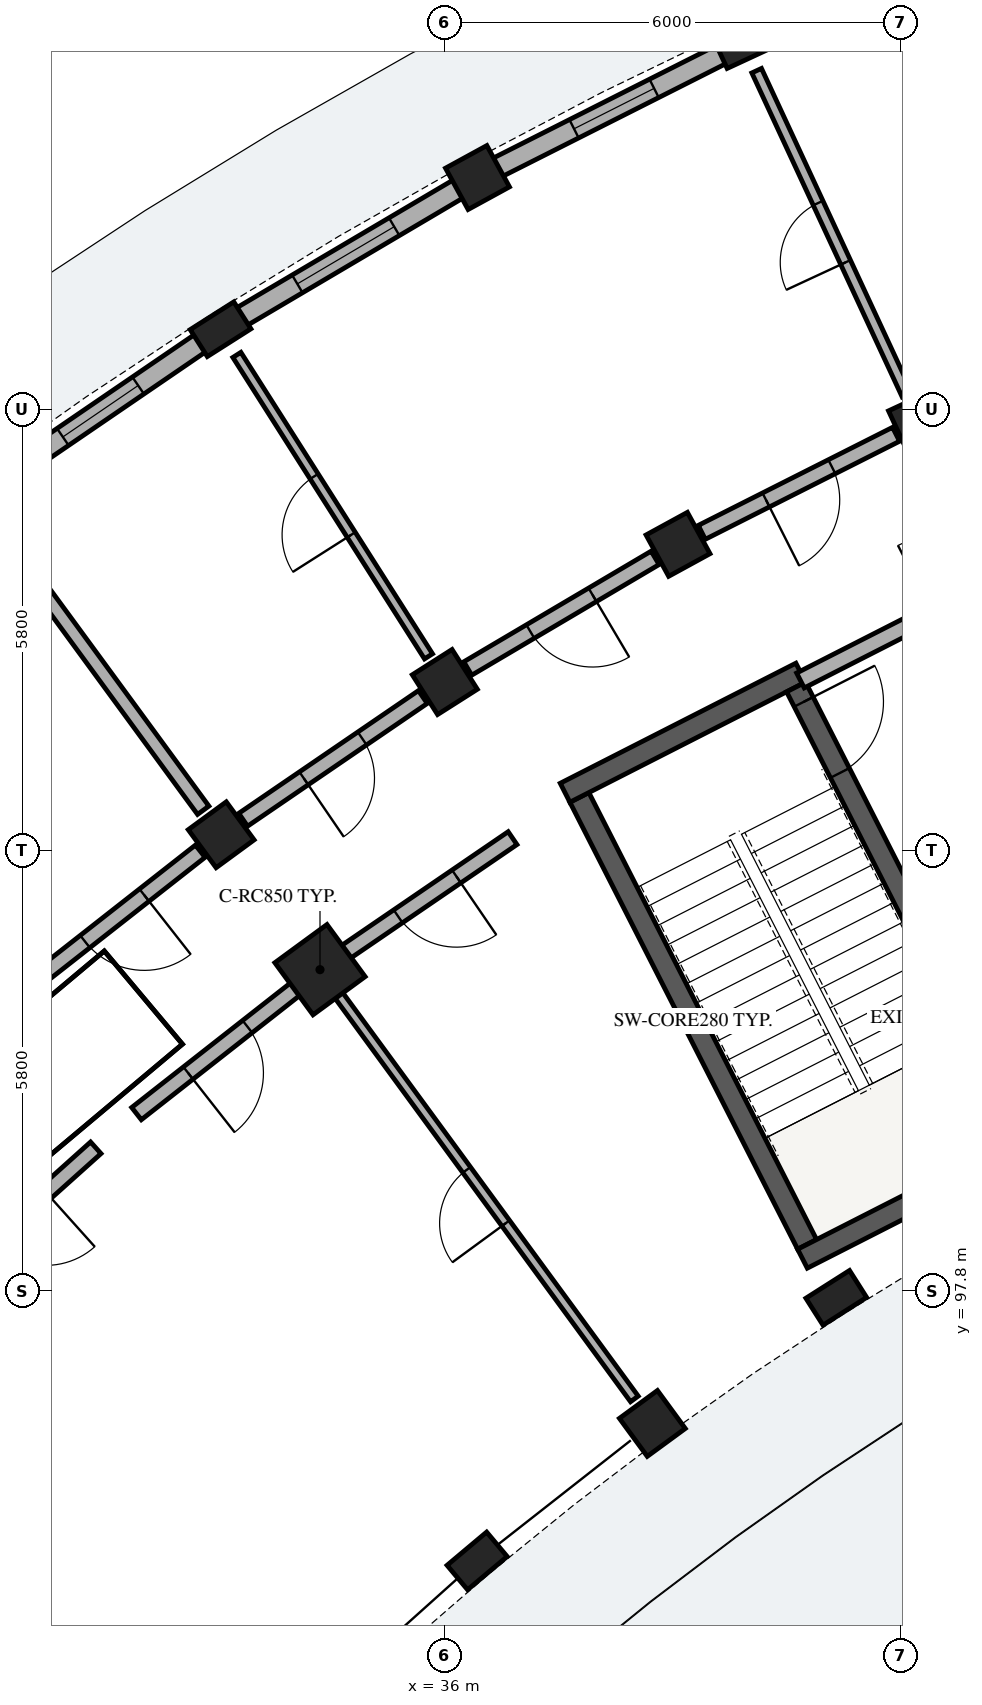
"""IFC4 building model, lengths in metres.
Left out: names, types, materials, properties, quantities, classifications, styles, units other than length and angle.
Written with IfcOpenShell. Run it as: python <this file> out.ifc"""

import sys

from ifc_helpers import new_model, si_unit, direction, frame, frame_2d, origin, origin_2d, place, context, subcontext, project, spatial, rectangle, extrude, element, fill, save


model = new_model("IFC4")
c1 = context("Model", 3, precision=1e-05, world=origin(), true_north=direction((0.0, 1.0)))
c2 = subcontext(c1, "Body", "Model", "MODEL_VIEW")
j1 = project(units=[si_unit("LENGTHUNIT", "METRE"), si_unit("PLANEANGLEUNIT", "RADIAN")], contexts=[c1])
p1 = place(None, origin())
s1 = spatial("IfcSite", under=j1, at=p1, CompositionType="ELEMENT")
p2 = place(p1, origin())
s2 = spatial("IfcBuilding", under=s1, at=p2, CompositionType="ELEMENT")
p3 = place(p2, origin())
s3 = spatial("IfcBuildingStorey", under=s2, at=p3, CompositionType="ELEMENT", Elevation=0.0)
p4 = place(p3, frame((37.773, 104.296, 0.0), z_axis=(0.0, 0.0, 1.0), x_axis=(0.453992276384, -0.891005618941, 0.0)))
e1 = element("IfcWall", 1, at=p4, inside=s3, PredefinedType="SHEAR", context=c2, shape_type="SweptSolid", body=[
    extrude(rectangle(XDim=6.6, YDim=0.28, at=frame_2d((3.3, 0.0))), origin(), (0.0, 0.0, 1.0), 4.48),
])
for number, where, z_axis, x_axis in (
    (2, (40.709, 98.227, 0.0), (0.0, 0.0, 1.0), (0.891, 0.454, 0.0)),
    (3, (37.585, 104.357, 0.0), (0.0, 0.0, 1.0), (0.891, 0.454, 0.0)),
):
    element("IfcWall", number, at=place(p3, frame(where, z_axis=z_axis, x_axis=x_axis)), inside=s3, PredefinedType="SHEAR", context=c2, shape_type="SweptSolid", body=[
        extrude(rectangle(XDim=3.48, YDim=0.28, at=frame_2d((1.74, 0.0))), origin(), (0.0, 0.0, 1.0), 4.48),
    ])
p5 = place(p3, frame((40.625, 105.748, 0.0), z_axis=(0.0, 0.0, 1.0), x_axis=(0.453992276384, -0.891005618941, 0.0)))
e4 = element("IfcWall", 4, at=p5, inside=s3, PredefinedType="SHEAR", context=c2, shape_type="SweptSolid", body=[
    extrude(rectangle(XDim=6.6, YDim=0.28, at=frame_2d((3.3, 0.0))), origin(), (0.0, 0.0, 1.0), 4.48),
])
p6 = place(p5, frame((0.22, 0.0, 0.0)))
e5 = element("IfcOpeningElement", 5, at=p6, cuts=e4, PredefinedType="OPENING", context=c2, shape_type="SweptSolid", body=[
    extrude(rectangle(XDim=1.05, YDim=2.15, at=frame_2d((0.525, 1.075))), frame((0.0, 0.15, 0.0), z_axis=(0.0, -1.0, 0.0), x_axis=(1.0, 0.0, 0.0)), (0.0, 0.0, 1.0), 0.3),
])
p7 = place(p3, frame((42.252, 109.23, 0.0), z_axis=(0.0, 0.0, 1.0), x_axis=(-0.420859924104, 0.907125638643, 0.0)))
e6 = element("IfcColumn", 6, at=p7, inside=s3, PredefinedType="COLUMN", context=c2, shape_type="SweptSolid", body=[
    extrude(rectangle(XDim=0.62, YDim=0.62, at=origin_2d()), origin(), (0.0, 0.0, 1.0), 4.485),
])
p8 = place(p3, frame((39.938, 114.219, 0.0), z_axis=(0.0, 0.0, 1.0), x_axis=(-0.420859924104, 0.907125638643, 0.0)))
e7 = element("IfcColumn", 7, at=p8, inside=s3, PredefinedType="PILASTER", context=c2, shape_type="SweptSolid", body=[
    extrude(rectangle(XDim=0.42, YDim=0.68, at=origin_2d()), origin(), (0.0, 0.0, 1.0), 4.485),
])
for number, where, z_axis, x_axis in (
    (8, (39.072, 107.625, 0.0), (0.0, 0.0, 1.0), (-0.48, 0.877, 0.0)),
    (9, (36.433, 112.451, 0.0), (0.0, 0.0, 1.0), (-0.48, 0.877, 0.0)),
):
    element("IfcColumn", number, at=place(p3, frame(where, z_axis=z_axis, x_axis=x_axis)), inside=s3, PredefinedType="COLUMN", context=c2, shape_type="SweptSolid", body=[
        extrude(rectangle(XDim=0.62, YDim=0.62, at=origin_2d()), origin(), (0.0, 0.0, 1.0), 4.485),
    ])
p9 = place(p3, frame((41.153, 97.712, 0.0), z_axis=(0.0, 0.0, 1.0), x_axis=(-0.536481603385, 0.843912015099, 0.0)))
e10 = element("IfcColumn", 10, at=p9, inside=s3, PredefinedType="PILASTER", context=c2, shape_type="SweptSolid", body=[
    extrude(rectangle(XDim=0.42, YDim=0.68, at=origin_2d()), origin(), (0.0, 0.0, 1.0), 4.485),
])
p10 = place(p3, frame((36.003, 105.813, 0.0), z_axis=(0.0, 0.0, 1.0), x_axis=(-0.536481603385, 0.843912015099, 0.0)))
e11 = element("IfcColumn", 11, at=p10, inside=s3, PredefinedType="COLUMN", context=c2, shape_type="SweptSolid", body=[
    extrude(rectangle(XDim=0.62, YDim=0.62, at=origin_2d()), origin(), (0.0, 0.0, 1.0), 4.485),
])
p11 = place(p3, frame((33.052, 110.455, 0.0), z_axis=(0.0, 0.0, 1.0), x_axis=(-0.536481603385, 0.843912015099, 0.0)))
e12 = element("IfcColumn", 12, at=p11, inside=s3, PredefinedType="PILASTER", context=c2, shape_type="SweptSolid", body=[
    extrude(rectangle(XDim=0.42, YDim=0.68, at=origin_2d()), origin(), (0.0, 0.0, 1.0), 4.485),
])
p12 = place(p3, frame((38.734, 96.059, 0.0), z_axis=(0.0, 0.0, 1.0), x_axis=(-0.590918628541, 0.806731166153, 0.0)))
e13 = element("IfcColumn", 13, at=p12, inside=s3, PredefinedType="COLUMN", context=c2, shape_type="SweptSolid", body=[
    extrude(rectangle(XDim=0.62, YDim=0.62, at=origin_2d()), origin(), (0.0, 0.0, 1.0), 4.485),
])
p13 = place(p3, frame((34.361, 102.029, 0.0), z_axis=(0.0, 0.0, 1.0), x_axis=(-0.590918628541, 0.806731166153, 0.0)))
e14 = element("IfcColumn", 14, at=p13, inside=s3, PredefinedType="COLUMN", context=c2, shape_type="SweptSolid", body=[
    extrude(rectangle(XDim=0.85, YDim=0.85, at=origin_2d()), origin(), (0.0, 0.0, 1.0), 4.485),
])
p14 = place(p3, frame((33.061, 103.804, 0.0), z_axis=(0.0, 0.0, 1.0), x_axis=(-0.590918628541, 0.806731166153, 0.0)))
e15 = element("IfcColumn", 15, at=p14, inside=s3, PredefinedType="COLUMN", context=c2, shape_type="SweptSolid", body=[
    extrude(rectangle(XDim=0.62, YDim=0.62, at=origin_2d()), origin(), (0.0, 0.0, 1.0), 4.485),
])
p15 = place(p3, frame((36.428, 94.251, 0.0), z_axis=(0.0, 0.0, 1.0), x_axis=(-0.642787636427, 0.766044420681, 0.0)))
e16 = element("IfcColumn", 16, at=p15, inside=s3, PredefinedType="PILASTER", context=c2, shape_type="SweptSolid", body=[
    extrude(rectangle(XDim=0.42, YDim=0.68, at=origin_2d()), origin(), (0.0, 0.0, 1.0), 4.485),
])
p16 = place(p3, frame((39.777, 114.138, 0.0), z_axis=(0.0, 0.0, 1.0), x_axis=(-0.892772658884, -0.450507468915, 0.0)))
e17 = element("IfcWall", 17, at=p16, inside=s3, PredefinedType="SOLIDWALL", context=c2, shape_type="SweptSolid", body=[
    extrude(rectangle(XDim=3.466, YDim=0.27, at=frame_2d((1.733, 0.0))), origin(), (0.0, 0.0, 1.0), 3.755),
])
p17 = place(p16, frame((1.143, 0.0, 0.55)))
e18 = element("IfcOpeningElement", 18, at=p17, cuts=e17, PredefinedType="OPENING", context=c2, shape_type="SweptSolid", body=[
    extrude(rectangle(XDim=1.18, YDim=1.48, at=frame_2d((0.59, 0.74))), frame((0.0, 0.145, 0.0), z_axis=(0.0, -1.0, 0.0), x_axis=(1.0, 0.0, 0.0)), (0.0, 0.0, 1.0), 0.29),
])
p18 = place(p3, frame((36.192, 112.308, 0.0), z_axis=(0.0, 0.0, 1.0), x_axis=(-0.861120000949, -0.508401754487, 0.0)))
e19 = element("IfcWall", 19, at=p18, inside=s3, PredefinedType="SOLIDWALL", context=c2, shape_type="SweptSolid", body=[
    extrude(rectangle(XDim=3.466, YDim=0.27, at=frame_2d((1.733, 0.0))), origin(), (0.0, 0.0, 1.0), 3.755),
])
p19 = place(p18, frame((0.993, 0.0, 0.55)))
e20 = element("IfcOpeningElement", 20, at=p19, cuts=e19, PredefinedType="OPENING", context=c2, shape_type="SweptSolid", body=[
    extrude(rectangle(XDim=1.48, YDim=1.62, at=frame_2d((0.74, 0.81))), frame((0.0, 0.145, 0.0), z_axis=(0.0, -1.0, 0.0), x_axis=(1.0, 0.0, 0.0)), (0.0, 0.0, 1.0), 0.29),
])
p20 = place(p3, frame((32.904, 110.354, 0.0), z_axis=(0.0, 0.0, 1.0), x_axis=(-0.825744165268, -0.564044832904, 0.0)))
e21 = element("IfcWall", 21, at=p20, inside=s3, PredefinedType="SOLIDWALL", context=c2, shape_type="SweptSolid", body=[
    extrude(rectangle(XDim=3.466, YDim=0.27, at=frame_2d((1.733, 0.0))), origin(), (0.0, 0.0, 1.0), 3.755),
])
p21 = place(p20, frame((1.133, 0.0, 0.55)))
e22 = element("IfcOpeningElement", 22, at=p21, cuts=e21, PredefinedType="OPENING", context=c2, shape_type="SweptSolid", body=[
    extrude(rectangle(XDim=1.2, YDim=1.51, at=frame_2d((0.6, 0.755))), frame((0.0, 0.145, 0.0), z_axis=(0.0, -1.0, 0.0), x_axis=(1.0, 0.0, 0.0)), (0.0, 0.0, 1.0), 0.29),
])
p22 = place(p3, frame((40.682, 105.834, 0.0), z_axis=(0.0, 0.0, 1.0), x_axis=(0.891003372311, 0.453996685595, 0.0)))
e23 = element("IfcWall", 23, at=p22, inside=s3, PredefinedType="PARTITIONING", context=c2, shape_type="SweptSolid", body=[
    extrude(rectangle(XDim=4.9, YDim=0.22, at=frame_2d((2.45, 0.0))), origin(), (0.0, 0.0, 1.0), 3.74),
])
p23 = place(p22, frame((1.95, 0.0, 0.0)))
e24 = element("IfcOpeningElement", 24, at=p23, cuts=e23, PredefinedType="OPENING", context=c2, shape_type="SweptSolid", body=[
    extrude(rectangle(XDim=1.0, YDim=2.15, at=frame_2d((0.5, 1.075))), frame((0.0, 0.12, 0.0), z_axis=(0.0, -1.0, 0.0), x_axis=(1.0, 0.0, 0.0)), (0.0, 0.0, 1.0), 0.24),
])
p24 = place(p3, frame((42.084, 109.593, 0.0), z_axis=(0.0, 0.0, 1.0), x_axis=(-0.420862519045, 0.907124434718, 0.0)))
e25 = element("IfcWall", 25, at=p24, inside=s3, PredefinedType="PLUMBINGWALL", context=c2, shape_type="SweptSolid", body=[
    extrude(rectangle(XDim=4.7, YDim=0.14, at=frame_2d((2.35, 0.0))), origin(), (0.0, 0.0, 1.0), 3.1),
])
p25 = place(p24, frame((1.92, 0.0, 0.0)))
e26 = element("IfcOpeningElement", 26, at=p25, cuts=e25, PredefinedType="OPENING", context=c2, shape_type="SweptSolid", body=[
    extrude(rectangle(XDim=0.86, YDim=2.06, at=frame_2d((0.43, 1.03))), frame((0.0, 0.08, 0.0), z_axis=(0.0, -1.0, 0.0), x_axis=(1.0, 0.0, 0.0)), (0.0, 0.0, 1.0), 0.16),
])
p26 = place(p3, frame((41.94, 109.073, 0.0), z_axis=(0.0, 0.0, 1.0), x_axis=(-0.89273239336, -0.450587254419, 0.0)))
e27 = element("IfcWall", 27, at=p26, inside=s3, PredefinedType="PARTITIONING", context=c2, shape_type="SweptSolid", body=[
    extrude(rectangle(XDim=2.863, YDim=0.205, at=frame_2d((1.432, 0.0))), origin(), (0.0, 0.0, 1.0), 3.1),
])
p27 = place(p26, frame((0.947, 0.0, 0.0)))
e28 = element("IfcOpeningElement", 28, at=p27, cuts=e27, PredefinedType="OPENING", context=c2, shape_type="SweptSolid", body=[
    extrude(rectangle(XDim=0.97, YDim=2.15, at=frame_2d((0.485, 1.075))), frame((0.0, 0.113, 0.0), z_axis=(0.0, -1.0, 0.0), x_axis=(1.0, 0.0, 0.0)), (0.0, 0.0, 1.0), 0.225),
])
p28 = place(p3, frame((38.77, 107.447, 0.0), z_axis=(0.0, 0.0, 1.0), x_axis=(-0.861113214678, -0.508413248753, 0.0)))
e29 = element("IfcWall", 29, at=p28, inside=s3, PredefinedType="PARTITIONING", context=c2, shape_type="SweptSolid", body=[
    extrude(rectangle(XDim=2.863, YDim=0.205, at=frame_2d((1.432, 0.0))), origin(), (0.0, 0.0, 1.0), 3.1),
])
p29 = place(p28, frame((0.957, 0.0, 0.0)))
e30 = element("IfcOpeningElement", 30, at=p29, cuts=e29, PredefinedType="OPENING", context=c2, shape_type="SweptSolid", body=[
    extrude(rectangle(XDim=0.95, YDim=2.13, at=frame_2d((0.475, 1.065))), frame((0.0, 0.113, 0.0), z_axis=(0.0, -1.0, 0.0), x_axis=(1.0, 0.0, 0.0)), (0.0, 0.0, 1.0), 0.225),
])
p30 = place(p3, frame((35.789, 106.151, 0.0), z_axis=(0.0, 0.0, 1.0), x_axis=(-0.536492262982, 0.843905238614, 0.0)))
e31 = element("IfcWall", 31, at=p30, inside=s3, PredefinedType="PARTITIONING", context=c2, shape_type="SweptSolid", body=[
    extrude(rectangle(XDim=4.7, YDim=0.125, at=frame_2d((2.35, 0.0))), origin(), (0.0, 0.0, 1.0), 3.1),
])
p31 = place(p30, frame((1.895, 0.0, 0.0)))
e32 = element("IfcOpeningElement", 32, at=p31, cuts=e31, PredefinedType="OPENING", context=c2, shape_type="SweptSolid", body=[
    extrude(rectangle(XDim=0.91, YDim=2.1, at=frame_2d((0.455, 1.05))), frame((0.0, 0.073, 0.0), z_axis=(0.0, -1.0, 0.0), x_axis=(1.0, 0.0, 0.0)), (0.0, 0.0, 1.0), 0.145),
])
p32 = place(p3, frame((35.714, 105.616, 0.0), z_axis=(0.0, 0.0, 1.0), x_axis=(-0.825779671787, -0.563992848947, 0.0)))
e33 = element("IfcWall", 33, at=p32, inside=s3, PredefinedType="PARTITIONING", context=c2, shape_type="SweptSolid", body=[
    extrude(rectangle(XDim=2.863, YDim=0.205, at=frame_2d((1.432, 0.0))), origin(), (0.0, 0.0, 1.0), 3.1),
])
p33 = place(p32, frame((0.967, 0.0, 0.0)))
e34 = element("IfcOpeningElement", 34, at=p33, cuts=e33, PredefinedType="OPENING", context=c2, shape_type="SweptSolid", body=[
    extrude(rectangle(XDim=0.93, YDim=2.12, at=frame_2d((0.465, 1.06))), frame((0.0, 0.113, 0.0), z_axis=(0.0, -1.0, 0.0), x_axis=(1.0, 0.0, 0.0)), (0.0, 0.0, 1.0), 0.225),
])
p34 = place(p3, frame((36.895, 103.76, 0.0), z_axis=(0.0, 0.0, 1.0), x_axis=(-0.825752009056, -0.56403334967, 0.0)))
e35 = element("IfcWall", 35, at=p34, inside=s3, PredefinedType="PARTITIONING", context=c2, shape_type="SweptSolid", body=[
    extrude(rectangle(XDim=2.718, YDim=0.205, at=frame_2d((1.359, 0.0))), origin(), (0.0, 0.0, 1.0), 3.1),
])
p35 = place(p34, frame((0.894, 0.0, 0.0)))
e36 = element("IfcOpeningElement", 36, at=p35, cuts=e35, PredefinedType="OPENING", context=c2, shape_type="SweptSolid", body=[
    extrude(rectangle(XDim=0.93, YDim=2.12, at=frame_2d((0.465, 1.06))), frame((0.0, 0.113, 0.0), z_axis=(0.0, -1.0, 0.0), x_axis=(1.0, 0.0, 0.0)), (0.0, 0.0, 1.0), 0.225),
])
p36 = place(p3, frame((32.824, 104.126, 0.0), z_axis=(0.0, 0.0, 1.0), x_axis=(-0.590910940129, 0.806736797745, 0.0)))
e37 = element("IfcWall", 37, at=p36, inside=s3, PredefinedType="PARTITIONING", context=c2, shape_type="SweptSolid", body=[
    extrude(rectangle(XDim=4.7, YDim=0.185, at=frame_2d((2.35, 0.0))), origin(), (0.0, 0.0, 1.0), 3.1),
])
p37 = place(p3, frame((38.497, 96.382, 0.0), z_axis=(0.0, 0.0, 1.0), x_axis=(-0.590924179316, 0.806727100263, 0.0)))
e38 = element("IfcWall", 38, at=p37, inside=s3, PredefinedType="PARTITIONING", context=c2, shape_type="SweptSolid", body=[
    extrude(rectangle(XDim=6.6, YDim=0.125, at=frame_2d((3.3, 0.0))), origin(), (0.0, 0.0, 1.0), 3.1),
])
p38 = place(p37, frame((2.865, 0.0, 0.0)))
e39 = element("IfcOpeningElement", 39, at=p38, cuts=e38, PredefinedType="OPENING", context=c2, shape_type="SweptSolid", body=[
    extrude(rectangle(XDim=0.87, YDim=2.08, at=frame_2d((0.435, 1.04))), frame((0.0, 0.073, 0.0), z_axis=(0.0, -1.0, 0.0), x_axis=(1.0, 0.0, 0.0)), (0.0, 0.0, 1.0), 0.145),
])
p39 = place(p3, frame((32.785, 103.588, 0.0), z_axis=(0.0, 0.0, 1.0), x_axis=(-0.786806323554, -0.617199975061, 0.0)))
e40 = element("IfcWall", 40, at=p39, inside=s3, PredefinedType="PARTITIONING", context=c2, shape_type="SweptSolid", body=[
    extrude(rectangle(XDim=2.863, YDim=0.205, at=frame_2d((1.432, 0.0))), origin(), (0.0, 0.0, 1.0), 3.1),
])
p40 = place(p39, frame((0.937, 0.0, 0.0)))
e41 = element("IfcOpeningElement", 41, at=p40, cuts=e40, PredefinedType="OPENING", context=c2, shape_type="SweptSolid", body=[
    extrude(rectangle(XDim=0.99, YDim=2.16, at=frame_2d((0.495, 1.08))), frame((0.0, 0.113, 0.0), z_axis=(0.0, -1.0, 0.0), x_axis=(1.0, 0.0, 0.0)), (0.0, 0.0, 1.0), 0.225),
])
p41 = place(p3, frame((34.085, 101.813, 0.0), z_axis=(0.0, 0.0, 1.0), x_axis=(-0.786835457019, -0.617162833924, 0.0)))
e42 = element("IfcWall", 42, at=p41, inside=s3, PredefinedType="PARTITIONING", context=c2, shape_type="SweptSolid", body=[
    extrude(rectangle(XDim=2.718, YDim=0.205, at=frame_2d((1.359, 0.0))), origin(), (0.0, 0.0, 1.0), 3.1),
])
p42 = place(p41, frame((0.864, 0.0, 0.0)))
e43 = element("IfcOpeningElement", 43, at=p42, cuts=e42, PredefinedType="OPENING", context=c2, shape_type="SweptSolid", body=[
    extrude(rectangle(XDim=0.99, YDim=2.16, at=frame_2d((0.495, 1.08))), frame((0.0, 0.113, 0.0), z_axis=(0.0, -1.0, 0.0), x_axis=(1.0, 0.0, 0.0)), (0.0, 0.0, 1.0), 0.225),
])
p43 = place(p3, frame((31.411, 99.686, 0.0), z_axis=(0.0, 0.0, 1.0), x_axis=(-0.744418559135, -0.667713268413, 0.0)))
e44 = element("IfcWall", 44, at=p43, inside=s3, PredefinedType="PARTITIONING", context=c2, shape_type="SweptSolid", body=[
    extrude(rectangle(XDim=2.718, YDim=0.205, at=frame_2d((1.359, 0.0))), origin(), (0.0, 0.0, 1.0), 3.1),
])
p44 = place(p43, frame((0.879, 0.0, 0.0)))
e45 = element("IfcOpeningElement", 45, at=p44, cuts=e44, PredefinedType="OPENING", context=c2, shape_type="SweptSolid", body=[
    extrude(rectangle(XDim=0.96, YDim=2.1, at=frame_2d((0.48, 1.05))), frame((0.0, 0.113, 0.0), z_axis=(0.0, -1.0, 0.0), x_axis=(1.0, 0.0, 0.0)), (0.0, 0.0, 1.0), 0.225),
])
p45 = place(p17, origin())
e46 = element("IfcWindow", 46, at=p45, inside=s3, PartitioningType="SINGLE_PANEL", PredefinedType="WINDOW", context=c2, shape_type="SweptSolid", body=[
    extrude(rectangle(XDim=1.18, YDim=1.48, at=frame_2d((0.59, 0.74))), frame((0.0, 0.03, 0.0), z_axis=(0.0, -1.0, 0.0), x_axis=(1.0, 0.0, 0.0)), (0.0, 0.0, 1.0), 0.06),
])
fill(e18, e46)
p46 = place(p19, origin())
e47 = element("IfcWindow", 47, at=p46, inside=s3, PartitioningType="SINGLE_PANEL", PredefinedType="WINDOW", context=c2, shape_type="SweptSolid", body=[
    extrude(rectangle(XDim=1.48, YDim=1.62, at=frame_2d((0.74, 0.81))), frame((0.0, 0.03, 0.0), z_axis=(0.0, -1.0, 0.0), x_axis=(1.0, 0.0, 0.0)), (0.0, 0.0, 1.0), 0.06),
])
fill(e20, e47)
p47 = place(p21, origin())
e48 = element("IfcWindow", 48, at=p47, inside=s3, PartitioningType="SINGLE_PANEL", PredefinedType="WINDOW", context=c2, shape_type="SweptSolid", body=[
    extrude(rectangle(XDim=1.2, YDim=1.51, at=frame_2d((0.6, 0.755))), frame((0.0, 0.03, 0.0), z_axis=(0.0, -1.0, 0.0), x_axis=(1.0, 0.0, 0.0)), (0.0, 0.0, 1.0), 0.06),
])
fill(e22, e48)
p48 = place(p6, origin())
e49 = element("IfcDoor", 49, at=p48, inside=s3, OperationType="SINGLE_SWING_LEFT", PredefinedType="DOOR", context=c2, shape_type="SweptSolid", body=[
    extrude(rectangle(XDim=1.05, YDim=2.15, at=frame_2d((0.525, 1.075))), frame((0.0, 0.025, 0.0), z_axis=(0.0, -1.0, 0.0), x_axis=(1.0, 0.0, 0.0)), (0.0, 0.0, 1.0), 0.05),
])
fill(e5, e49)
p49 = place(p25, origin())
e50 = element("IfcDoor", 50, at=p49, inside=s3, OperationType="SINGLE_SWING_LEFT", PredefinedType="DOOR", context=c2, shape_type="SweptSolid", body=[
    extrude(rectangle(XDim=0.86, YDim=2.06, at=frame_2d((0.43, 1.03))), frame((0.0, 0.025, 0.0), z_axis=(0.0, -1.0, 0.0), x_axis=(1.0, 0.0, 0.0)), (0.0, 0.0, 1.0), 0.05),
])
fill(e26, e50)
p50 = place(p27, origin())
e51 = element("IfcDoor", 51, at=p50, inside=s3, OperationType="SINGLE_SWING_RIGHT", PredefinedType="DOOR", context=c2, shape_type="SweptSolid", body=[
    extrude(rectangle(XDim=0.97, YDim=2.15, at=frame_2d((0.485, 1.075))), frame((0.0, 0.025, 0.0), z_axis=(0.0, -1.0, 0.0), x_axis=(1.0, 0.0, 0.0)), (0.0, 0.0, 1.0), 0.05),
])
fill(e28, e51)
p51 = place(p29, origin())
e52 = element("IfcDoor", 52, at=p51, inside=s3, OperationType="SINGLE_SWING_LEFT", PredefinedType="DOOR", context=c2, shape_type="SweptSolid", body=[
    extrude(rectangle(XDim=0.95, YDim=2.13, at=frame_2d((0.475, 1.065))), frame((0.0, 0.025, 0.0), z_axis=(0.0, -1.0, 0.0), x_axis=(1.0, 0.0, 0.0)), (0.0, 0.0, 1.0), 0.05),
])
fill(e30, e52)
p52 = place(p31, origin())
e53 = element("IfcDoor", 53, at=p52, inside=s3, OperationType="SINGLE_SWING_LEFT", PredefinedType="DOOR", context=c2, shape_type="SweptSolid", body=[
    extrude(rectangle(XDim=0.91, YDim=2.1, at=frame_2d((0.455, 1.05))), frame((0.0, 0.025, 0.0), z_axis=(0.0, -1.0, 0.0), x_axis=(1.0, 0.0, 0.0)), (0.0, 0.0, 1.0), 0.05),
])
fill(e32, e53)
p53 = place(p33, origin())
e54 = element("IfcDoor", 54, at=p53, inside=s3, OperationType="SINGLE_SWING_RIGHT", PredefinedType="DOOR", context=c2, shape_type="SweptSolid", body=[
    extrude(rectangle(XDim=0.93, YDim=2.12, at=frame_2d((0.465, 1.06))), frame((0.0, 0.025, 0.0), z_axis=(0.0, -1.0, 0.0), x_axis=(1.0, 0.0, 0.0)), (0.0, 0.0, 1.0), 0.05),
])
fill(e34, e54)
p54 = place(p35, origin())
e55 = element("IfcDoor", 55, at=p54, inside=s3, OperationType="SINGLE_SWING_LEFT", PredefinedType="DOOR", context=c2, shape_type="SweptSolid", body=[
    extrude(rectangle(XDim=0.93, YDim=2.12, at=frame_2d((0.465, 1.06))), frame((0.0, 0.025, 0.0), z_axis=(0.0, -1.0, 0.0), x_axis=(1.0, 0.0, 0.0)), (0.0, 0.0, 1.0), 0.05),
])
fill(e36, e55)
p55 = place(p38, origin())
e56 = element("IfcDoor", 56, at=p55, inside=s3, OperationType="SINGLE_SWING_LEFT", PredefinedType="DOOR", context=c2, shape_type="SweptSolid", body=[
    extrude(rectangle(XDim=0.87, YDim=2.08, at=frame_2d((0.435, 1.04))), frame((0.0, 0.025, 0.0), z_axis=(0.0, -1.0, 0.0), x_axis=(1.0, 0.0, 0.0)), (0.0, 0.0, 1.0), 0.05),
])
fill(e39, e56)
p56 = place(p40, origin())
e57 = element("IfcDoor", 57, at=p56, inside=s3, OperationType="SINGLE_SWING_LEFT", PredefinedType="DOOR", context=c2, shape_type="SweptSolid", body=[
    extrude(rectangle(XDim=0.99, YDim=2.16, at=frame_2d((0.495, 1.08))), frame((0.0, 0.025, 0.0), z_axis=(0.0, -1.0, 0.0), x_axis=(1.0, 0.0, 0.0)), (0.0, 0.0, 1.0), 0.05),
])
fill(e41, e57)
p57 = place(p42, origin())
e58 = element("IfcDoor", 58, at=p57, inside=s3, OperationType="SINGLE_SWING_RIGHT", PredefinedType="DOOR", context=c2, shape_type="SweptSolid", body=[
    extrude(rectangle(XDim=0.99, YDim=2.16, at=frame_2d((0.495, 1.08))), frame((0.0, 0.025, 0.0), z_axis=(0.0, -1.0, 0.0), x_axis=(1.0, 0.0, 0.0)), (0.0, 0.0, 1.0), 0.05),
])
fill(e43, e58)
save(model, sys.argv[1])
